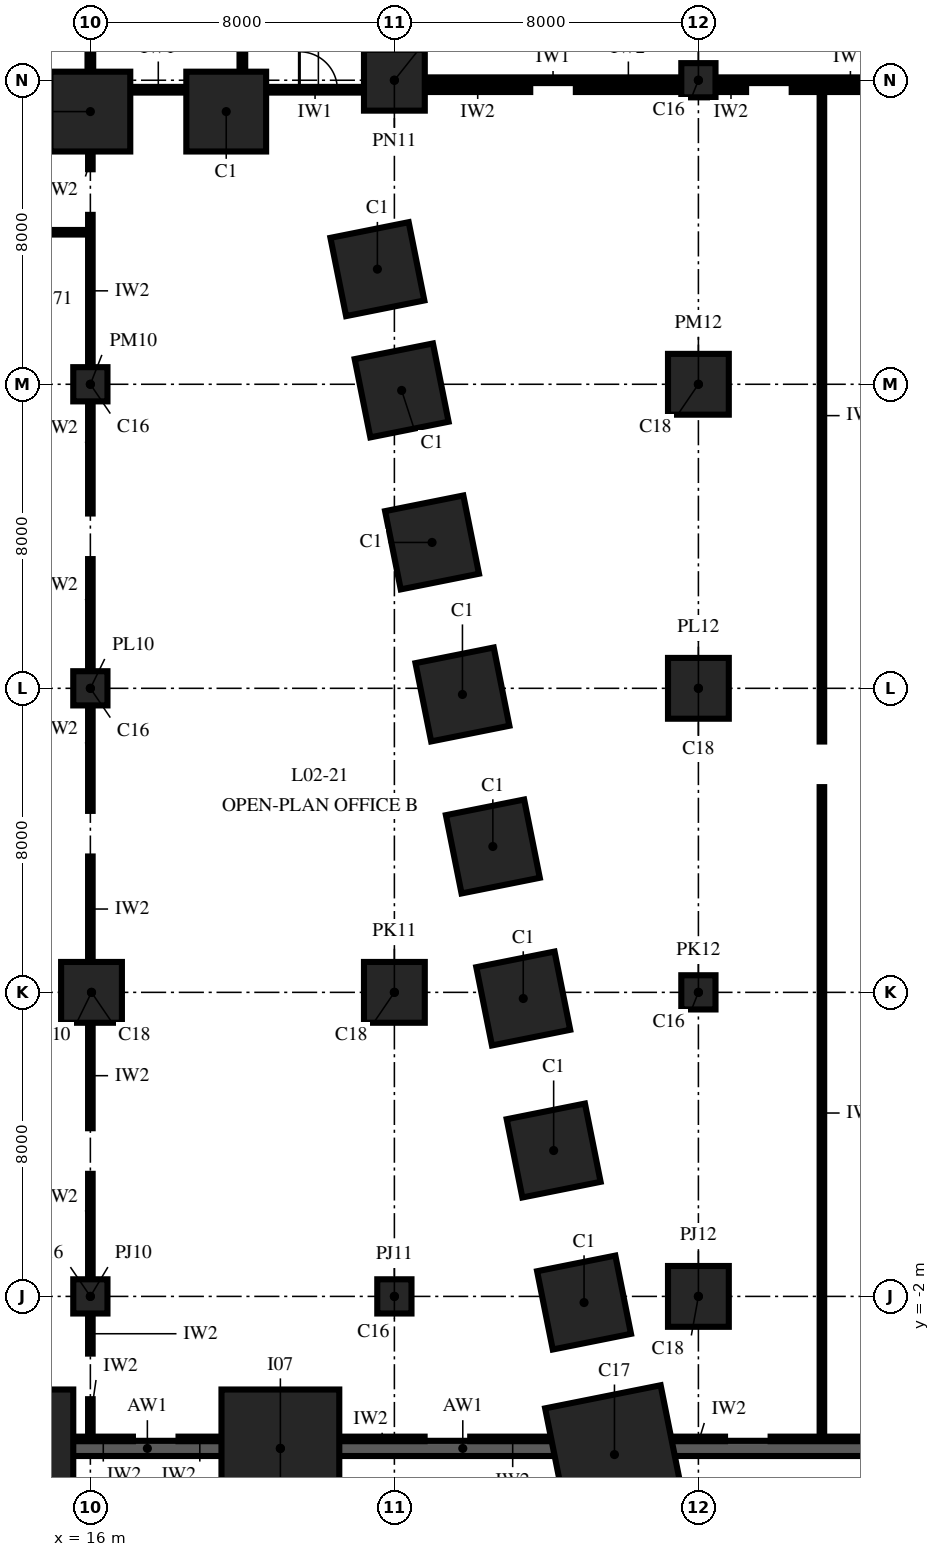
"""IFC4 building model, lengths in metres.
Left out: names, types, materials, properties, quantities, classifications, styles, units other than length and angle.
Written with IfcOpenShell. Run it as: python <this file> out.ifc"""

import sys

from ifc_helpers import new_model, si_unit, direction, frame, frame_2d, origin, origin_2d, place, context, subcontext, project, spatial, rectangle, extrude, element, fill, save


model = new_model("IFC4")
c1 = context("Model", 3, precision=1e-05, world=origin(), true_north=direction((0.0, 1.0)))
c2 = subcontext(c1, "Body", "Model", "MODEL_VIEW")
j1 = project(units=[si_unit("LENGTHUNIT", "METRE"), si_unit("PLANEANGLEUNIT", "RADIAN")], contexts=[c1])
p1 = place(None, origin())
s1 = spatial("IfcSite", under=j1, at=p1, CompositionType="ELEMENT")
p2 = place(p1, origin())
s2 = spatial("IfcBuilding", under=s1, at=p2, CompositionType="ELEMENT")
p3 = place(p2, frame((0.0, 0.0, 12.0)))
s3 = spatial("IfcBuildingStorey", under=s2, at=p3, CompositionType="ELEMENT", Elevation=12.0)
p4 = place(p3, frame((29.791, -6.162, 0.0), z_axis=(0.0, 0.0, 1.0), x_axis=(-0.196116135138, 0.980580675691, 0.0)))
e1 = element("IfcColumn", 1, at=p4, inside=s3, PredefinedType="COLUMN", context=c2, shape_type="SweptSolid", body=[
    extrude(rectangle(XDim=3.1, YDim=3.1, at=origin_2d()), origin(), (0.0, 0.0, 1.0), 7.0),
])
for number, where, z_axis, x_axis in (
    (2, (28.991, -2.162, 0.0), (0.0, 0.0, 1.0), (-0.196, 0.981, 0.0)),
    (3, (28.191, 1.838, 0.0), (0.0, 0.0, 1.0), (-0.196, 0.981, 0.0)),
    (4, (27.391, 5.838, 0.0), (0.0, 0.0, 1.0), (-0.196, 0.981, 0.0)),
    (5, (26.591, 9.838, 0.0), (0.0, 0.0, 1.0), (-0.196, 0.981, 0.0)),
    (6, (25.791, 13.838, 0.0), (0.0, 0.0, 1.0), (-0.196, 0.981, 0.0)),
    (7, (24.991, 17.838, 0.0), (0.0, 0.0, 1.0), (-0.196, 0.981, 0.0)),
    (8, (24.191, 21.838, 0.0), (0.0, 0.0, 1.0), (-0.196, 0.981, 0.0)),
    (9, (23.553, 25.029, 0.0), (0.0, 0.0, 1.0), (-0.196, 0.981, 0.0)),
    (10, (19.575, 29.175, 0.0), (0.0, 0.0, 1.0), (-1.0, 0.0, 0.0)),
    (11, (16.0, 29.175, 0.0), (0.0, 0.0, 1.0), (-1.0, 0.0, 0.0)),
):
    element("IfcColumn", number, at=place(p3, frame(where, z_axis=z_axis, x_axis=x_axis)), inside=s3, PredefinedType="COLUMN", context=c2, shape_type="SweptSolid", body=[
        extrude(rectangle(XDim=2.1, YDim=2.1, at=origin_2d()), origin(), (0.0, 0.0, 1.0), 7.0),
    ])
for number, where, z_axis, x_axis in (
    (12, (14.0, -6.0, 0.0), (0.0, 0.0, 1.0), (1.0, 0.0, 0.0)),
    (13, (21.0, -6.0, 0.0), (0.0, 0.0, 1.0), (1.0, 0.0, 0.0)),
):
    element("IfcColumn", number, at=place(p3, frame(where, z_axis=z_axis, x_axis=x_axis)), inside=s3, PredefinedType="COLUMN", context=c2, shape_type="SweptSolid", body=[
        extrude(rectangle(XDim=3.1, YDim=3.1, at=origin_2d()), origin(), (0.0, 0.0, 1.0), 7.0),
    ])
p5 = place(p3, frame((16.0, -2.0, 0.0), z_axis=(0.0, 0.0, 1.0), x_axis=(1.0, 0.0, 0.0)))
e14 = element("IfcColumn", 14, at=p5, inside=s3, PredefinedType="COLUMN", context=c2, shape_type="SweptSolid", body=[
    extrude(rectangle(XDim=0.9, YDim=0.9, at=origin_2d()), origin(), (0.0, 0.0, 1.0), 7.0),
])
p6 = place(p3, frame((16.03, 6.0, 0.0), z_axis=(0.0, 0.0, 1.0), x_axis=(1.0, 0.0, 0.0)))
e15 = element("IfcColumn", 15, at=p6, inside=s3, PredefinedType="COLUMN", context=c2, shape_type="SweptSolid", body=[
    extrude(rectangle(XDim=1.6, YDim=1.6, at=origin_2d()), origin(), (0.0, 0.0, 1.0), 7.0),
])
for number, where, z_axis, x_axis in (
    (16, (16.0, 14.0, 0.0), (0.0, 0.0, 1.0), (1.0, 0.0, 0.0)),
    (17, (16.0, 22.0, 0.0), (0.0, 0.0, 1.0), (1.0, 0.0, 0.0)),
    (18, (24.0, -2.0, 0.0), (0.0, 0.0, 1.0), (1.0, 0.0, 0.0)),
):
    element("IfcColumn", number, at=place(p3, frame(where, z_axis=z_axis, x_axis=x_axis)), inside=s3, PredefinedType="COLUMN", context=c2, shape_type="SweptSolid", body=[
        extrude(rectangle(XDim=0.9, YDim=0.9, at=origin_2d()), origin(), (0.0, 0.0, 1.0), 7.0),
    ])
for number, where, z_axis, x_axis in (
    (19, (24.0, 6.0, 0.0), (0.0, 0.0, 1.0), (1.0, 0.0, 0.0)),
    (20, (24.0, 30.0, 0.0), (0.0, 0.0, 1.0), (1.0, 0.0, 0.0)),
    (21, (32.0, -2.0, 0.0), (0.0, 0.0, 1.0), (1.0, 0.0, 0.0)),
):
    element("IfcColumn", number, at=place(p3, frame(where, z_axis=z_axis, x_axis=x_axis)), inside=s3, PredefinedType="COLUMN", context=c2, shape_type="SweptSolid", body=[
        extrude(rectangle(XDim=1.6, YDim=1.6, at=origin_2d()), origin(), (0.0, 0.0, 1.0), 7.0),
    ])
p7 = place(p3, frame((32.0, 6.0, 0.0), z_axis=(0.0, 0.0, 1.0), x_axis=(1.0, 0.0, 0.0)))
e22 = element("IfcColumn", 22, at=p7, inside=s3, PredefinedType="COLUMN", context=c2, shape_type="SweptSolid", body=[
    extrude(rectangle(XDim=0.9, YDim=0.9, at=origin_2d()), origin(), (0.0, 0.0, 1.0), 7.0),
])
for number, where, z_axis, x_axis in (
    (23, (32.0, 14.0, 0.0), (0.0, 0.0, 1.0), (1.0, 0.0, 0.0)),
    (24, (32.0, 22.0, 0.0), (0.0, 0.0, 1.0), (1.0, 0.0, 0.0)),
):
    element("IfcColumn", number, at=place(p3, frame(where, z_axis=z_axis, x_axis=x_axis)), inside=s3, PredefinedType="COLUMN", context=c2, shape_type="SweptSolid", body=[
        extrude(rectangle(XDim=1.6, YDim=1.6, at=origin_2d()), origin(), (0.0, 0.0, 1.0), 7.0),
    ])
p8 = place(p3, frame((32.0, 30.0, 0.0), z_axis=(0.0, 0.0, 1.0), x_axis=(1.0, 0.0, 0.0)))
e25 = element("IfcColumn", 25, at=p8, inside=s3, PredefinedType="COLUMN", context=c2, shape_type="SweptSolid", body=[
    extrude(rectangle(XDim=0.9, YDim=0.9, at=origin_2d()), origin(), (0.0, 0.0, 1.0), 7.0),
])
p9 = place(p3, frame((14.65, -6.0, 0.0), z_axis=(0.0, 0.0, 1.0), x_axis=(1.0, 0.0, 0.0)))
e26 = element("IfcWall", 26, at=p9, inside=s3, PredefinedType="SHEAR", context=c2, shape_type="SweptSolid", body=[
    extrude(rectangle(XDim=5.7, YDim=0.4, at=frame_2d((2.85, 0.0))), origin(), (0.0, 0.0, 1.0), 7.0),
])
p10 = place(p3, frame((21.65, -6.0, 0.0), z_axis=(0.0, 0.0, 1.0), x_axis=(1.0, 0.0, 0.0)))
e27 = element("IfcWall", 27, at=p10, inside=s3, PredefinedType="SHEAR", context=c2, shape_type="SweptSolid", body=[
    extrude(rectangle(XDim=8.3, YDim=0.4, at=frame_2d((4.15, 0.0))), origin(), (0.0, 0.0, 1.0), 7.0),
])
p11 = place(p3, frame((31.25, -6.0, 0.0), z_axis=(0.0, 0.0, 1.0), x_axis=(1.0, 0.0, 0.0)))
e28 = element("IfcWall", 28, at=p11, inside=s3, PredefinedType="SHEAR", context=c2, shape_type="SweptSolid", body=[
    extrude(rectangle(XDim=17.05, YDim=0.4, at=frame_2d((8.525, 0.0))), origin(), (0.0, 0.0, 1.0), 7.0),
])
for number, where, z_axis, x_axis in (
    (29, (16.0, -5.75, 0.0), (0.0, 0.0, 1.0), (0.0, 1.0, 0.0)),
    (30, (16.0, -3.505, 0.0), (0.0, 0.0, 1.0), (0.0, 1.0, 0.0)),
):
    element("IfcWall", number, at=place(p3, frame(where, z_axis=z_axis, x_axis=x_axis)), inside=s3, PredefinedType="PARTITIONING", context=c2, shape_type="SweptSolid", body=[
        extrude(rectangle(XDim=1.045, YDim=0.12, at=frame_2d((0.522, 0.0))), origin(), (0.0, 0.0, 1.0), 6.7),
    ])
p12 = place(p3, frame((16.0, -1.54, 0.0), z_axis=(0.0, 0.0, 1.0), x_axis=(0.0, 1.0, 0.0)))
e31 = element("IfcWall", 31, at=p12, inside=s3, PredefinedType="PARTITIONING", context=c2, shape_type="SweptSolid", body=[
    extrude(rectangle(XDim=2.765, YDim=0.12, at=frame_2d((1.383, 0.0))), origin(), (0.0, 0.0, 1.0), 6.05),
])
for number, where, z_axis, x_axis in (
    (32, (16.0, 2.425, 0.0), (0.0, 0.0, 1.0), (0.0, 1.0, 0.0)),
    (33, (16.0, 6.81, 0.0), (0.0, 0.0, 1.0), (0.0, 1.0, 0.0)),
):
    element("IfcWall", number, at=place(p3, frame(where, z_axis=z_axis, x_axis=x_axis)), inside=s3, PredefinedType="PARTITIONING", context=c2, shape_type="SweptSolid", body=[
        extrude(rectangle(XDim=2.765, YDim=0.12, at=frame_2d((1.382, 0.0))), origin(), (0.0, 0.0, 1.0), 6.05),
    ])
p13 = place(p3, frame((16.0, 10.775, 0.0), z_axis=(0.0, 0.0, 1.0), x_axis=(0.0, 1.0, 0.0)))
e34 = element("IfcWall", 34, at=p13, inside=s3, PredefinedType="PARTITIONING", context=c2, shape_type="SweptSolid", body=[
    extrude(rectangle(XDim=2.765, YDim=0.12, at=frame_2d((1.383, 0.0))), origin(), (0.0, 0.0, 1.0), 6.05),
])
for number, where, z_axis, x_axis in (
    (35, (16.0, 14.46, 0.0), (0.0, 0.0, 1.0), (0.0, 1.0, 0.0)),
    (36, (16.0, 18.6, 0.0), (0.0, 0.0, 1.0), (0.0, 1.0, 0.0)),
):
    element("IfcWall", number, at=place(p3, frame(where, z_axis=z_axis, x_axis=x_axis)), inside=s3, PredefinedType="PARTITIONING", context=c2, shape_type="SweptSolid", body=[
        extrude(rectangle(XDim=2.94, YDim=0.12, at=frame_2d((1.47, 0.0))), origin(), (0.0, 0.0, 1.0), 6.05),
    ])
p14 = place(p3, frame((16.0, 22.46, 0.0), z_axis=(0.0, 0.0, 1.0), x_axis=(0.0, 1.0, 0.0)))
e37 = element("IfcWall", 37, at=p14, inside=s3, PredefinedType="PARTITIONING", context=c2, shape_type="SweptSolid", body=[
    extrude(rectangle(XDim=3.998, YDim=0.12, at=frame_2d((1.999, 0.0))), origin(), (0.0, 0.0, 1.0), 6.7),
])
p15 = place(p3, frame((16.0, 27.657, 0.0), z_axis=(0.0, 0.0, 1.0), x_axis=(0.0, 1.0, 0.0)))
e38 = element("IfcWall", 38, at=p15, inside=s3, PredefinedType="PARTITIONING", context=c2, shape_type="SweptSolid", body=[
    extrude(rectangle(XDim=0.458, YDim=0.12, at=frame_2d((0.229, 0.0))), origin(), (0.0, 0.0, 1.0), 6.7),
])
p16 = place(p3, frame((16.0, 30.235, 0.0), z_axis=(0.0, 0.0, 1.0), x_axis=(0.0, 1.0, 0.0)))
e39 = element("IfcWall", 39, at=p16, inside=s3, PredefinedType="PARTITIONING", context=c2, shape_type="SweptSolid", body=[
    extrude(rectangle(XDim=7.305, YDim=0.15, at=frame_2d((3.652, 0.0))), origin(), (0.0, 0.0, 1.0), 6.7),
])
p17 = place(p16, frame((4.265, 0.0, 0.0)))
e40 = element("IfcOpeningElement", 40, at=p17, cuts=e39, PredefinedType="OPENING", context=c2, shape_type="SweptSolid", body=[
    extrude(rectangle(XDim=1.0, YDim=2.1, at=frame_2d((0.5, 1.05))), frame((0.0, 0.09, 0.0), z_axis=(0.0, -1.0, 0.0), x_axis=(1.0, 0.0, 0.0)), (0.0, 0.0, 1.0), 0.18),
])
p18 = place(p3, frame((20.0, 30.235, 0.0), z_axis=(0.0, 0.0, 1.0), x_axis=(0.0, 1.0, 0.0)))
e41 = element("IfcWall", 41, at=p18, inside=s3, PredefinedType="PARTITIONING", context=c2, shape_type="SweptSolid", body=[
    extrude(rectangle(XDim=15.765, YDim=0.15, at=frame_2d((7.882, 0.0))), origin(), (0.0, 0.0, 1.0), 6.7),
])
for number, where, z_axis, x_axis in (
    (42, (35.25, -5.75, 0.0), (0.0, 0.0, 1.0), (0.0, 1.0, 0.0)),
    (43, (35.25, 12.6, 0.0), (0.0, 0.0, 1.0), (0.0, 1.0, 0.0)),
):
    element("IfcWall", number, at=place(p3, frame(where, z_axis=z_axis, x_axis=x_axis)), inside=s3, PredefinedType="PARTITIONING", context=c2, shape_type="SweptSolid", body=[
        extrude(rectangle(XDim=17.15, YDim=0.12, at=frame_2d((8.575, 0.0))), origin(), (0.0, 0.0, 1.0), 6.7),
    ])
p19 = place(p3, frame((15.56, -5.75, 0.0), z_axis=(0.0, 0.0, 1.0), x_axis=(1.0, 0.0, 0.0)))
e44 = element("IfcWall", 44, at=p19, inside=s3, PredefinedType="PARTITIONING", context=c2, shape_type="SweptSolid", body=[
    extrude(rectangle(XDim=1.56, YDim=0.12, at=frame_2d((0.78, 0.0))), origin(), (0.0, 0.0, 1.0), 6.7),
])
p20 = place(p3, frame((18.32, -5.75, 0.0), z_axis=(0.0, 0.0, 1.0), x_axis=(1.0, 0.0, 0.0)))
e45 = element("IfcWall", 45, at=p20, inside=s3, PredefinedType="PARTITIONING", context=c2, shape_type="SweptSolid", body=[
    extrude(rectangle(XDim=1.12, YDim=0.12, at=frame_2d((0.56, 0.0))), origin(), (0.0, 0.0, 1.0), 6.7),
])
for number, where, z_axis, x_axis in (
    (46, (22.56, -5.75, 0.0), (0.0, 0.0, 1.0), (1.0, 0.0, 0.0)),
    (47, (25.996, -5.75, 0.0), (0.0, 0.0, 1.0), (1.0, 0.0, 0.0)),
):
    element("IfcWall", number, at=place(p3, frame(where, z_axis=z_axis, x_axis=x_axis)), inside=s3, PredefinedType="PARTITIONING", context=c2, shape_type="SweptSolid", body=[
        extrude(rectangle(XDim=2.235, YDim=0.12, at=frame_2d((1.118, 0.0))), origin(), (0.0, 0.0, 1.0), 6.7),
    ])
p21 = place(p3, frame((31.351, -5.75, 0.0), z_axis=(0.0, 0.0, 1.0), x_axis=(1.0, 0.0, 0.0)))
e48 = element("IfcWall", 48, at=p21, inside=s3, PredefinedType="PARTITIONING", context=c2, shape_type="SweptSolid", body=[
    extrude(rectangle(XDim=1.349, YDim=0.12, at=frame_2d((0.675, 0.0))), origin(), (0.0, 0.0, 1.0), 6.7),
])
p22 = place(p3, frame((33.9, -5.75, 0.0), z_axis=(0.0, 0.0, 1.0), x_axis=(1.0, 0.0, 0.0)))
e49 = element("IfcWall", 49, at=p22, inside=s3, PredefinedType="PARTITIONING", context=c2, shape_type="SweptSolid", body=[
    extrude(rectangle(XDim=21.85, YDim=0.12, at=frame_2d((10.925, 0.0))), origin(), (0.0, 0.0, 1.0), 6.7),
])
p23 = place(p3, frame((0.6, 26.0, 0.0), z_axis=(0.0, 0.0, 1.0), x_axis=(1.0, 0.0, 0.0)))
e50 = element("IfcWall", 50, at=p23, inside=s3, PredefinedType="PARTITIONING", context=c2, shape_type="SweptSolid", body=[
    extrude(rectangle(XDim=15.4, YDim=0.12, at=frame_2d((7.7, 0.0))), origin(), (0.0, 0.0, 1.0), 6.7),
])
p24 = place(p3, frame((17.06, 29.75, 0.0), z_axis=(0.0, 0.0, 1.0), x_axis=(1.0, 0.0, 0.0)))
e51 = element("IfcWall", 51, at=p24, inside=s3, PredefinedType="PARTITIONING", context=c2, shape_type="SweptSolid", body=[
    extrude(rectangle(XDim=1.455, YDim=0.15, at=frame_2d((0.728, 0.0))), origin(), (0.0, 0.0, 1.0), 6.7),
])
p25 = place(p3, frame((20.635, 29.75, 0.0), z_axis=(0.0, 0.0, 1.0), x_axis=(1.0, 0.0, 0.0)))
e52 = element("IfcWall", 52, at=p25, inside=s3, PredefinedType="PARTITIONING", context=c2, shape_type="SweptSolid", body=[
    extrude(rectangle(XDim=2.555, YDim=0.15, at=frame_2d((1.277, 0.0))), origin(), (0.0, 0.0, 1.0), 6.7),
])
p26 = place(p25, frame((0.865, 0.0, 0.0)))
e53 = element("IfcOpeningElement", 53, at=p26, cuts=e52, PredefinedType="OPENING", context=c2, shape_type="SweptSolid", body=[
    extrude(rectangle(XDim=1.0, YDim=2.1, at=frame_2d((0.5, 1.05))), frame((0.0, 0.09, 0.0), z_axis=(0.0, -1.0, 0.0), x_axis=(1.0, 0.0, 0.0)), (0.0, 0.0, 1.0), 0.18),
])
p27 = place(p3, frame((24.81, 29.75, 0.0), z_axis=(0.0, 0.0, 1.0), x_axis=(1.0, 0.0, 0.0)))
e54 = element("IfcWall", 54, at=p27, inside=s3, PredefinedType="PARTITIONING", context=c2, shape_type="SweptSolid", body=[
    extrude(rectangle(XDim=2.765, YDim=0.12, at=frame_2d((1.382, 0.0))), origin(), (0.0, 0.0, 1.0), 6.05),
])
p28 = place(p3, frame((28.775, 29.75, 0.0), z_axis=(0.0, 0.0, 1.0), x_axis=(1.0, 0.0, 0.0)))
e55 = element("IfcWall", 55, at=p28, inside=s3, PredefinedType="PARTITIONING", context=c2, shape_type="SweptSolid", body=[
    extrude(rectangle(XDim=2.765, YDim=0.12, at=frame_2d((1.383, 0.0))), origin(), (0.0, 0.0, 1.0), 6.05),
])
p29 = place(p3, frame((32.46, 29.75, 0.0), z_axis=(0.0, 0.0, 1.0), x_axis=(1.0, 0.0, 0.0)))
e56 = element("IfcWall", 56, at=p29, inside=s3, PredefinedType="PARTITIONING", context=c2, shape_type="SweptSolid", body=[
    extrude(rectangle(XDim=0.795, YDim=0.12, at=frame_2d((0.397, 0.0))), origin(), (0.0, 0.0, 1.0), 6.05),
])
p30 = place(p3, frame((34.455, 29.75, 0.0), z_axis=(0.0, 0.0, 1.0), x_axis=(1.0, 0.0, 0.0)))
e57 = element("IfcWall", 57, at=p30, inside=s3, PredefinedType="PARTITIONING", context=c2, shape_type="SweptSolid", body=[
    extrude(rectangle(XDim=5.085, YDim=0.12, at=frame_2d((2.542, 0.0))), origin(), (0.0, 0.0, 1.0), 6.05),
])
p31 = place(p3, frame((24.81, 30.0, 0.0), z_axis=(0.0, 0.0, 1.0), x_axis=(1.0, 0.0, 0.0)))
e58 = element("IfcWall", 58, at=p31, inside=s3, PredefinedType="PARTITIONING", context=c2, shape_type="SweptSolid", body=[
    extrude(rectangle(XDim=6.73, YDim=0.15, at=frame_2d((3.365, 0.0))), origin(), (0.0, 0.0, 1.0), 6.05),
])
p32 = place(p3, frame((32.46, 30.0, 0.0), z_axis=(0.0, 0.0, 1.0), x_axis=(1.0, 0.0, 0.0)))
e59 = element("IfcWall", 59, at=p32, inside=s3, PredefinedType="PARTITIONING", context=c2, shape_type="SweptSolid", body=[
    extrude(rectangle(XDim=7.08, YDim=0.15, at=frame_2d((3.54, 0.0))), origin(), (0.0, 0.0, 1.0), 6.05),
])
p33 = place(p26, origin())
e60 = element("IfcDoor", 60, at=p33, inside=s3, OperationType="SINGLE_SWING_LEFT", PredefinedType="DOOR", context=c2, shape_type="SweptSolid", body=[
    extrude(rectangle(XDim=1.0, YDim=2.1, at=frame_2d((0.5, 1.05))), frame((0.0, 0.075, 0.0), z_axis=(0.0, -1.0, 0.0), x_axis=(1.0, 0.0, 0.0)), (0.0, 0.0, 1.0), 0.149),
])
fill(e53, e60)
save(model, sys.argv[1])
